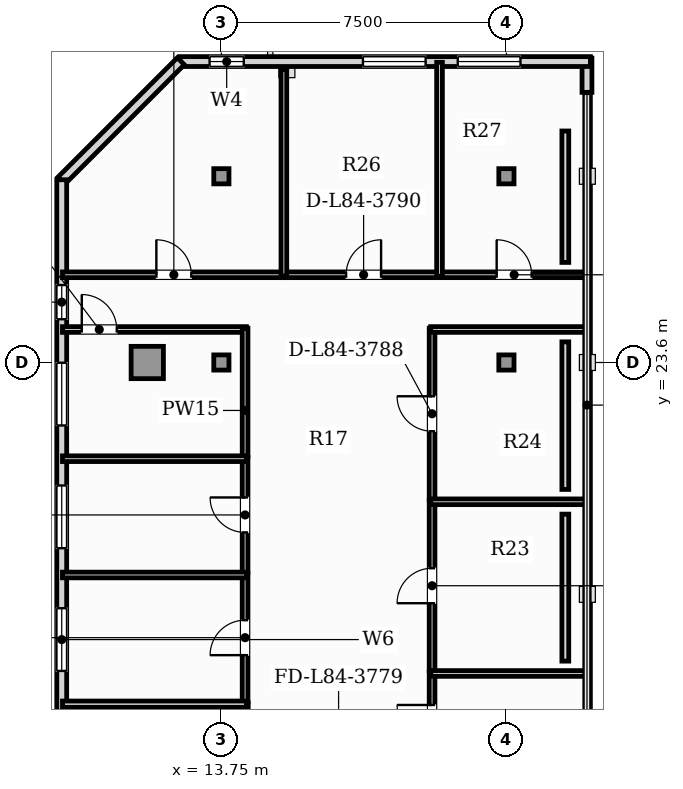
"""IFC4 building model, lengths in metres.
Left out: names, types, materials, properties, quantities, classifications, styles, units other than length and angle.
Written with IfcOpenShell. Run it as: python <this file> out.ifc"""

import sys

from ifc_helpers import new_model, si_unit, direction, frame, frame_2d, origin, origin_2d, place, context, subcontext, project, spatial, rectangle, hollow_rectangle, extrude, element, fill, save


model = new_model("IFC4")
c1 = context("Model", 3, precision=1e-05, world=origin(), true_north=direction((0.0, 1.0)))
c2 = subcontext(c1, "Body", "Model", "MODEL_VIEW")
j1 = project(units=[si_unit("LENGTHUNIT", "METRE"), si_unit("PLANEANGLEUNIT", "RADIAN")], contexts=[c1])
p1 = place(None, origin())
s1 = spatial("IfcSite", under=j1, at=p1, CompositionType="ELEMENT")
p2 = place(p1, origin())
s2 = spatial("IfcBuilding", under=s1, at=p2, CompositionType="ELEMENT")
p3 = place(p2, frame((0.0, 0.0, 341.35)))
s3 = spatial("IfcBuildingStorey", under=s2, at=p3, CompositionType="ELEMENT", Elevation=341.35)
p4 = place(p3, frame((11.8, 23.6, 0.0), z_axis=(0.0, 0.0, 1.0), x_axis=(1.0, 0.0, 0.0)))
e1 = element("IfcColumn", 1, at=p4, inside=s3, PredefinedType="USERDEFINED", context=c2, shape_type="SweptSolid", body=[
    extrude(hollow_rectangle(XDim=0.85, YDim=0.85, WallThickness=0.05, at=origin_2d()), origin(), (0.0, 0.0, 1.0), 3.85),
])
for number, where, z_axis, x_axis in (
    (2, (13.75, 23.6, 0.0), (0.0, 0.0, 1.0), (1.0, 0.0, 0.0)),
    (3, (21.25, 23.6, 0.0), (0.0, 0.0, 1.0), (1.0, 0.0, 0.0)),
    (4, (13.75, 28.5, 0.0), (0.0, 0.0, 1.0), (1.0, 0.0, 0.0)),
    (5, (21.25, 28.5, 0.0), (0.0, 0.0, 1.0), (1.0, 0.0, 0.0)),
):
    element("IfcColumn", number, at=place(p3, frame(where, z_axis=z_axis, x_axis=x_axis)), inside=s3, PredefinedType="COLUMN", context=c2, shape_type="SweptSolid", body=[
        extrude(hollow_rectangle(XDim=0.4, YDim=0.4, WallThickness=0.02, at=origin_2d()), origin(), (0.0, 0.0, 1.0), 3.85),
    ])
p5 = place(p3, frame((23.37, 30.708, 0.0), z_axis=(0.0, 0.0, 1.0), x_axis=(0.0, 1.0, 0.0)))
e6 = element("IfcWall", 6, at=p5, inside=s3, PredefinedType="SOLIDWALL", context=c2, shape_type="SweptSolid", body=[
    extrude(rectangle(XDim=0.9, YDim=0.26, at=frame_2d((0.45, 0.0))), origin(), (0.0, 0.0, 1.0), 3.63),
])
p6 = place(p3, frame((23.46, 31.518, 0.0), z_axis=(0.0, 0.0, 1.0), x_axis=(-1.0, 0.0, 0.0)))
e7 = element("IfcWall", 7, at=p6, inside=s3, PredefinedType="SOLIDWALL", context=c2, shape_type="SweptSolid", body=[
    extrude(rectangle(XDim=10.801, YDim=0.26, at=frame_2d((5.4, 0.0))), origin(), (0.0, 0.0, 1.0), 3.63),
])
p7 = place(p6, frame((9.121, 0.0, 0.95)))
e8 = element("IfcOpeningElement", 8, at=p7, cuts=e7, PredefinedType="OPENING", context=c2, shape_type="SweptSolid", body=[
    extrude(rectangle(XDim=0.9, YDim=1.5, at=frame_2d((0.45, 0.75))), frame((0.0, 0.14, 0.0), z_axis=(0.0, -1.0, 0.0), x_axis=(1.0, 0.0, 0.0)), (0.0, 0.0, 1.0), 0.28),
])
p8 = place(p6, frame((4.335, 0.0, 0.88)))
e9 = element("IfcOpeningElement", 9, at=p8, cuts=e7, PredefinedType="OPENING", context=c2, shape_type="SweptSolid", body=[
    extrude(rectangle(XDim=1.65, YDim=2.0, at=frame_2d((0.825, 1.0))), frame((0.0, 0.14, 0.0), z_axis=(0.0, -1.0, 0.0), x_axis=(1.0, 0.0, 0.0)), (0.0, 0.0, 1.0), 0.28),
])
p9 = place(p6, frame((1.84, 0.0, 0.88)))
e10 = element("IfcOpeningElement", 10, at=p9, cuts=e7, PredefinedType="OPENING", context=c2, shape_type="SweptSolid", body=[
    extrude(rectangle(XDim=1.65, YDim=2.0, at=frame_2d((0.825, 1.0))), frame((0.0, 0.14, 0.0), z_axis=(0.0, -1.0, 0.0), x_axis=(1.0, 0.0, 0.0)), (0.0, 0.0, 1.0), 0.28),
])
p10 = place(p3, frame((12.683, 31.528, 0.0), z_axis=(0.0, 0.0, 1.0), x_axis=(-0.707106781187, -0.707106781187, 0.0)))
e11 = element("IfcWall", 11, at=p10, inside=s3, PredefinedType="SOLIDWALL", context=c2, shape_type="SweptSolid", body=[
    extrude(rectangle(XDim=4.445, YDim=0.26, at=frame_2d((2.223, 0.0))), origin(), (0.0, 0.0, 1.0), 3.63),
])
p11 = place(p3, frame((9.55, 28.408, 0.0), z_axis=(0.0, 0.0, 1.0), x_axis=(0.0, -1.0, 0.0)))
e12 = element("IfcWall", 12, at=p11, inside=s3, PredefinedType="SOLIDWALL", context=c2, shape_type="SweptSolid", body=[
    extrude(rectangle(XDim=25.168, YDim=0.26, at=frame_2d((12.584, 0.0))), origin(), (0.0, 0.0, 1.0), 3.63),
])
p12 = place(p11, frame((19.503, 0.0, 0.88)))
e13 = element("IfcOpeningElement", 13, at=p12, cuts=e12, PredefinedType="OPENING", context=c2, shape_type="SweptSolid", body=[
    extrude(rectangle(XDim=1.65, YDim=2.0, at=frame_2d((0.825, 1.0))), frame((0.0, 0.14, 0.0), z_axis=(0.0, -1.0, 0.0), x_axis=(1.0, 0.0, 0.0)), (0.0, 0.0, 1.0), 0.28),
])
p13 = place(p11, frame((2.77, 0.0, 0.95)))
e14 = element("IfcOpeningElement", 14, at=p13, cuts=e12, PredefinedType="OPENING", context=c2, shape_type="SweptSolid", body=[
    extrude(rectangle(XDim=0.9, YDim=1.5, at=frame_2d((0.45, 0.75))), frame((0.0, 0.14, 0.0), z_axis=(0.0, -1.0, 0.0), x_axis=(1.0, 0.0, 0.0)), (0.0, 0.0, 1.0), 0.28),
])
p14 = place(p11, frame((11.274, 0.0, 0.88)))
e15 = element("IfcOpeningElement", 15, at=p14, cuts=e12, PredefinedType="OPENING", context=c2, shape_type="SweptSolid", body=[
    extrude(rectangle(XDim=1.65, YDim=2.0, at=frame_2d((0.825, 1.0))), frame((0.0, 0.14, 0.0), z_axis=(0.0, -1.0, 0.0), x_axis=(1.0, 0.0, 0.0)), (0.0, 0.0, 1.0), 0.28),
])
p15 = place(p11, frame((8.044, 0.0, 0.88)))
e16 = element("IfcOpeningElement", 16, at=p15, cuts=e12, PredefinedType="OPENING", context=c2, shape_type="SweptSolid", body=[
    extrude(rectangle(XDim=1.65, YDim=2.0, at=frame_2d((0.825, 1.0))), frame((0.0, 0.14, 0.0), z_axis=(0.0, -1.0, 0.0), x_axis=(1.0, 0.0, 0.0)), (0.0, 0.0, 1.0), 0.28),
])
p16 = place(p11, frame((4.815, 0.0, 0.88)))
e17 = element("IfcOpeningElement", 17, at=p16, cuts=e12, PredefinedType="OPENING", context=c2, shape_type="SweptSolid", body=[
    extrude(rectangle(XDim=1.65, YDim=2.0, at=frame_2d((0.825, 1.0))), frame((0.0, 0.14, 0.0), z_axis=(0.0, -1.0, 0.0), x_axis=(1.0, 0.0, 0.0)), (0.0, 0.0, 1.0), 0.28),
])
p17 = place(p3, frame((14.374, 12.805, 0.0), z_axis=(0.0, 0.0, 1.0), x_axis=(0.0, 1.0, 0.0)))
e18 = element("IfcWall", 18, at=p17, inside=s3, PredefinedType="PLUMBINGWALL", context=c2, shape_type="SweptSolid", body=[
    extrude(rectangle(XDim=1.84, YDim=0.165, at=frame_2d((0.92, 0.0))), origin(), (0.0, 0.0, 1.0), 3.63),
])
p18 = place(p17, frame((0.495, 0.0, 0.0)))
e19 = element("IfcOpeningElement", 19, at=p18, cuts=e18, PredefinedType="OPENING", context=c2, shape_type="SweptSolid", body=[
    extrude(rectangle(XDim=0.85, YDim=2.1, at=frame_2d((0.425, 1.05))), frame((0.0, 0.093, 0.0), z_axis=(0.0, -1.0, 0.0), x_axis=(1.0, 0.0, 0.0)), (0.0, 0.0, 1.0), 0.185),
])
p19 = place(p3, frame((14.374, 14.675, 0.0), z_axis=(0.0, 0.0, 1.0), x_axis=(0.0, 1.0, 0.0)))
e20 = element("IfcWall", 20, at=p19, inside=s3, PredefinedType="PARTITIONING", context=c2, shape_type="SweptSolid", body=[
    extrude(rectangle(XDim=3.369, YDim=0.15, at=frame_2d((1.685, 0.0))), origin(), (0.0, 0.0, 1.0), 3.63),
])
p20 = place(p19, frame((1.225, 0.0, 0.0)))
e21 = element("IfcOpeningElement", 21, at=p20, cuts=e20, PredefinedType="OPENING", context=c2, shape_type="SweptSolid", body=[
    extrude(rectangle(XDim=0.92, YDim=2.1, at=frame_2d((0.46, 1.05))), frame((0.0, 0.085, 0.0), z_axis=(0.0, -1.0, 0.0), x_axis=(1.0, 0.0, 0.0)), (0.0, 0.0, 1.0), 0.17),
])
p21 = place(p3, frame((14.374, 18.074, 0.0), z_axis=(0.0, 0.0, 1.0), x_axis=(0.0, 1.0, 0.0)))
e22 = element("IfcWall", 22, at=p21, inside=s3, PredefinedType="PARTITIONING", context=c2, shape_type="SweptSolid", body=[
    extrude(rectangle(XDim=3.03, YDim=0.15, at=frame_2d((1.515, 0.0))), origin(), (0.0, 0.0, 1.0), 3.63),
])
p22 = place(p21, frame((1.055, 0.0, 0.0)))
e23 = element("IfcOpeningElement", 23, at=p22, cuts=e22, PredefinedType="OPENING", context=c2, shape_type="SweptSolid", body=[
    extrude(rectangle(XDim=0.92, YDim=2.1, at=frame_2d((0.46, 1.05))), frame((0.0, 0.085, 0.0), z_axis=(0.0, -1.0, 0.0), x_axis=(1.0, 0.0, 0.0)), (0.0, 0.0, 1.0), 0.17),
])
p23 = place(p3, frame((9.569, 24.468, 0.0), z_axis=(0.0, 0.0, 1.0), x_axis=(1.0, 0.0, 0.0)))
e24 = element("IfcWall", 24, at=p23, inside=s3, PredefinedType="PARTITIONING", context=c2, shape_type="SweptSolid", body=[
    extrude(rectangle(XDim=4.84, YDim=0.15, at=frame_2d((2.42, 0.0))), origin(), (0.0, 0.0, 1.0), 3.63),
])
p24 = place(p23, frame((0.508, 0.0, 0.0)))
e25 = element("IfcOpeningElement", 25, at=p24, cuts=e24, PredefinedType="OPENING", context=c2, shape_type="SweptSolid", body=[
    extrude(rectangle(XDim=0.92, YDim=2.1, at=frame_2d((0.46, 1.05))), frame((0.0, 0.085, 0.0), z_axis=(0.0, -1.0, 0.0), x_axis=(1.0, 0.0, 0.0)), (0.0, 0.0, 1.0), 0.17),
])
p25 = place(p3, frame((14.374, 21.134, 0.0), z_axis=(0.0, 0.0, 1.0), x_axis=(0.0, 1.0, 0.0)))
e26 = element("IfcWall", 26, at=p25, inside=s3, PredefinedType="PARTITIONING", context=c2, shape_type="SweptSolid", body=[
    extrude(rectangle(XDim=3.369, YDim=0.15, at=frame_2d((1.685, 0.0))), origin(), (0.0, 0.0, 1.0), 3.63),
])
p26 = place(p3, frame((19.294, 12.805, 0.0), z_axis=(0.0, 0.0, 1.0), x_axis=(0.0, 1.0, 0.0)))
e27 = element("IfcWall", 27, at=p26, inside=s3, PredefinedType="PARTITIONING", context=c2, shape_type="SweptSolid", body=[
    extrude(rectangle(XDim=2.648, YDim=0.15, at=frame_2d((1.324, 0.0))), origin(), (0.0, 0.0, 1.0), 3.63),
])
p27 = place(p26, frame((0.864, 0.0, 0.0)))
e28 = element("IfcOpeningElement", 28, at=p27, cuts=e27, PredefinedType="OPENING", context=c2, shape_type="SweptSolid", body=[
    extrude(rectangle(XDim=0.92, YDim=2.1, at=frame_2d((0.46, 1.05))), frame((0.0, 0.085, 0.0), z_axis=(0.0, -1.0, 0.0), x_axis=(1.0, 0.0, 0.0)), (0.0, 0.0, 1.0), 0.17),
])
p28 = place(p3, frame((19.294, 15.483, 0.0), z_axis=(0.0, 0.0, 1.0), x_axis=(0.0, 1.0, 0.0)))
e29 = element("IfcWall", 29, at=p28, inside=s3, PredefinedType="PARTITIONING", context=c2, shape_type="SweptSolid", body=[
    extrude(rectangle(XDim=4.488, YDim=0.15, at=frame_2d((2.244, 0.0))), origin(), (0.0, 0.0, 1.0), 3.63),
])
p29 = place(p28, frame((1.784, 0.0, 0.0)))
e30 = element("IfcOpeningElement", 30, at=p29, cuts=e29, PredefinedType="OPENING", context=c2, shape_type="SweptSolid", body=[
    extrude(rectangle(XDim=0.92, YDim=2.1, at=frame_2d((0.46, 1.05))), frame((0.0, 0.085, 0.0), z_axis=(0.0, -1.0, 0.0), x_axis=(1.0, 0.0, 0.0)), (0.0, 0.0, 1.0), 0.17),
])
p30 = place(p3, frame((19.294, 20.0, 0.0), z_axis=(0.0, 0.0, 1.0), x_axis=(0.0, 1.0, 0.0)))
e31 = element("IfcWall", 31, at=p30, inside=s3, PredefinedType="PARTITIONING", context=c2, shape_type="SweptSolid", body=[
    extrude(rectangle(XDim=4.503, YDim=0.15, at=frame_2d((2.251, 0.0))), origin(), (0.0, 0.0, 1.0), 3.63),
])
p31 = place(p30, frame((1.792, 0.0, 0.0)))
e32 = element("IfcOpeningElement", 32, at=p31, cuts=e31, PredefinedType="OPENING", context=c2, shape_type="SweptSolid", body=[
    extrude(rectangle(XDim=0.92, YDim=2.1, at=frame_2d((0.46, 1.05))), frame((0.0, 0.085, 0.0), z_axis=(0.0, -1.0, 0.0), x_axis=(1.0, 0.0, 0.0)), (0.0, 0.0, 1.0), 0.17),
])
p32 = place(p3, frame((19.259, 24.468, 0.0), z_axis=(0.0, 0.0, 1.0), x_axis=(1.0, 0.0, 0.0)))
e33 = element("IfcWall", 33, at=p32, inside=s3, PredefinedType="PARTITIONING", context=c2, shape_type="SweptSolid", body=[
    extrude(rectangle(XDim=4.093, YDim=0.15, at=frame_2d((2.047, 0.0))), origin(), (0.0, 0.0, 1.0), 3.63),
])
p33 = place(p3, frame((9.569, 25.908, 0.0), z_axis=(0.0, 0.0, 1.0), x_axis=(1.0, 0.0, 0.0)))
e34 = element("IfcWall", 34, at=p33, inside=s3, PredefinedType="PARTITIONING", context=c2, shape_type="SweptSolid", body=[
    extrude(rectangle(XDim=5.861, YDim=0.15, at=frame_2d((2.93, 0.0))), origin(), (0.0, 0.0, 1.0), 3.63),
])
p34 = place(p33, frame((2.47, 0.0, 0.0)))
e35 = element("IfcOpeningElement", 35, at=p34, cuts=e34, PredefinedType="OPENING", context=c2, shape_type="SweptSolid", body=[
    extrude(rectangle(XDim=0.92, YDim=2.1, at=frame_2d((0.46, 1.05))), frame((0.0, 0.085, 0.0), z_axis=(0.0, -1.0, 0.0), x_axis=(1.0, 0.0, 0.0)), (0.0, 0.0, 1.0), 0.17),
])
p35 = place(p3, frame((15.46, 25.908, 0.0), z_axis=(0.0, 0.0, 1.0), x_axis=(1.0, 0.0, 0.0)))
e36 = element("IfcWall", 36, at=p35, inside=s3, PredefinedType="PARTITIONING", context=c2, shape_type="SweptSolid", body=[
    extrude(rectangle(XDim=4.065, YDim=0.15, at=frame_2d((2.033, 0.0))), origin(), (0.0, 0.0, 1.0), 3.63),
])
p36 = place(p35, frame((1.573, 0.0, 0.0)))
e37 = element("IfcOpeningElement", 37, at=p36, cuts=e36, PredefinedType="OPENING", context=c2, shape_type="SweptSolid", body=[
    extrude(rectangle(XDim=0.92, YDim=2.1, at=frame_2d((0.46, 1.05))), frame((0.0, 0.085, 0.0), z_axis=(0.0, -1.0, 0.0), x_axis=(1.0, 0.0, 0.0)), (0.0, 0.0, 1.0), 0.17),
])
p37 = place(p3, frame((19.555, 25.908, 0.0), z_axis=(0.0, 0.0, 1.0), x_axis=(1.0, 0.0, 0.0)))
e38 = element("IfcWall", 38, at=p37, inside=s3, PredefinedType="PARTITIONING", context=c2, shape_type="SweptSolid", body=[
    extrude(rectangle(XDim=3.797, YDim=0.15, at=frame_2d((1.898, 0.0))), origin(), (0.0, 0.0, 1.0), 3.63),
])
p38 = place(p37, frame((1.439, 0.0, 0.0)))
e39 = element("IfcOpeningElement", 39, at=p38, cuts=e38, PredefinedType="OPENING", context=c2, shape_type="SweptSolid", body=[
    extrude(rectangle(XDim=0.92, YDim=2.1, at=frame_2d((0.46, 1.05))), frame((0.0, 0.085, 0.0), z_axis=(0.0, -1.0, 0.0), x_axis=(1.0, 0.0, 0.0)), (0.0, 0.0, 1.0), 0.17),
])
p39 = place(p3, frame((9.569, 14.61, 0.0), z_axis=(0.0, 0.0, 1.0), x_axis=(1.0, 0.0, 0.0)))
e40 = element("IfcWall", 40, at=p39, inside=s3, PredefinedType="PLUMBINGWALL", context=c2, shape_type="SweptSolid", body=[
    extrude(rectangle(XDim=4.84, YDim=0.165, at=frame_2d((2.42, 0.0))), origin(), (0.0, 0.0, 1.0), 3.63),
])
for number, where, z_axis, x_axis in (
    (41, (9.569, 18.009, 0.0), (0.0, 0.0, 1.0), (1.0, 0.0, 0.0)),
    (42, (9.569, 21.069, 0.0), (0.0, 0.0, 1.0), (1.0, 0.0, 0.0)),
):
    element("IfcWall", number, at=place(p3, frame(where, z_axis=z_axis, x_axis=x_axis)), inside=s3, PredefinedType="PARTITIONING", context=c2, shape_type="SweptSolid", body=[
        extrude(rectangle(XDim=4.84, YDim=0.15, at=frame_2d((2.42, 0.0))), origin(), (0.0, 0.0, 1.0), 3.63),
    ])
for number, where, z_axis, x_axis in (
    (43, (19.259, 15.417, 0.0), (0.0, 0.0, 1.0), (1.0, 0.0, 0.0)),
    (44, (19.259, 19.935, 0.0), (0.0, 0.0, 1.0), (1.0, 0.0, 0.0)),
):
    element("IfcWall", number, at=place(p3, frame(where, z_axis=z_axis, x_axis=x_axis)), inside=s3, PredefinedType="PARTITIONING", context=c2, shape_type="SweptSolid", body=[
        extrude(rectangle(XDim=4.093, YDim=0.15, at=frame_2d((2.047, 0.0))), origin(), (0.0, 0.0, 1.0), 3.63),
    ])
p40 = place(p3, frame((15.395, 25.873, 0.0), z_axis=(0.0, 0.0, 1.0), x_axis=(0.0, 1.0, 0.0)))
e45 = element("IfcWall", 45, at=p40, inside=s3, PredefinedType="PARTITIONING", context=c2, shape_type="SweptSolid", body=[
    extrude(rectangle(XDim=5.443, YDim=0.15, at=frame_2d((2.722, 0.0))), origin(), (0.0, 0.0, 1.0), 3.63),
])
p41 = place(p3, frame((19.49, 25.873, 0.0), z_axis=(0.0, 0.0, 1.0), x_axis=(0.0, 1.0, 0.0)))
e46 = element("IfcWall", 46, at=p41, inside=s3, PredefinedType="PARTITIONING", context=c2, shape_type="SweptSolid", body=[
    extrude(rectangle(XDim=5.625, YDim=0.15, at=frame_2d((2.813, 0.0))), origin(), (0.0, 0.0, 1.0), 3.63),
])
p42 = place(p3, frame((22.8, 19.61, 0.0), z_axis=(0.0, 0.0, 1.0), x_axis=(0.0, -1.0, 0.0)))
e47 = element("IfcWall", 47, at=p42, inside=s3, PredefinedType="PARTITIONING", context=c2, shape_type="SweptSolid", body=[
    extrude(rectangle(XDim=3.867, YDim=0.18, at=frame_2d((1.934, 0.0))), origin(), (0.0, 0.0, 1.0), 3.63),
])
p43 = place(p3, frame((22.8, 24.143, 0.0), z_axis=(0.0, 0.0, 1.0), x_axis=(0.0, -1.0, 0.0)))
e48 = element("IfcWall", 48, at=p43, inside=s3, PredefinedType="PARTITIONING", context=c2, shape_type="SweptSolid", body=[
    extrude(rectangle(XDim=3.883, YDim=0.18, at=frame_2d((1.941, 0.0))), origin(), (0.0, 0.0, 1.0), 3.63),
])
p44 = place(p3, frame((22.8, 29.692, 0.0), z_axis=(0.0, 0.0, 1.0), x_axis=(0.0, -1.0, 0.0)))
e49 = element("IfcWall", 49, at=p44, inside=s3, PredefinedType="PARTITIONING", context=c2, shape_type="SweptSolid", body=[
    extrude(rectangle(XDim=3.458, YDim=0.18, at=frame_2d((1.729, 0.0))), origin(), (0.0, 0.0, 1.0), 3.63),
])
p45 = place(p13, origin())
e50 = element("IfcWindow", 50, at=p45, inside=s3, PartitioningType="SINGLE_PANEL", PredefinedType="WINDOW", context=c2, shape_type="SweptSolid", body=[
    extrude(rectangle(XDim=0.9, YDim=1.5, at=frame_2d((0.45, 0.75))), frame((0.0, 0.03, 0.0), z_axis=(0.0, -1.0, 0.0), x_axis=(1.0, 0.0, 0.0)), (0.0, 0.0, 1.0), 0.06),
])
fill(e14, e50)
p46 = place(p14, origin())
e51 = element("IfcWindow", 51, at=p46, inside=s3, PartitioningType="SINGLE_PANEL", PredefinedType="WINDOW", context=c2, shape_type="SweptSolid", body=[
    extrude(rectangle(XDim=1.65, YDim=2.0, at=frame_2d((0.825, 1.0))), frame((0.0, 0.03, 0.0), z_axis=(0.0, -1.0, 0.0), x_axis=(1.0, 0.0, 0.0)), (0.0, 0.0, 1.0), 0.06),
])
fill(e15, e51)
p47 = place(p15, origin())
e52 = element("IfcWindow", 52, at=p47, inside=s3, PartitioningType="SINGLE_PANEL", PredefinedType="WINDOW", context=c2, shape_type="SweptSolid", body=[
    extrude(rectangle(XDim=1.65, YDim=2.0, at=frame_2d((0.825, 1.0))), frame((0.0, 0.03, 0.0), z_axis=(0.0, -1.0, 0.0), x_axis=(1.0, 0.0, 0.0)), (0.0, 0.0, 1.0), 0.06),
])
fill(e16, e52)
p48 = place(p16, origin())
e53 = element("IfcWindow", 53, at=p48, inside=s3, PartitioningType="SINGLE_PANEL", PredefinedType="WINDOW", context=c2, shape_type="SweptSolid", body=[
    extrude(rectangle(XDim=1.65, YDim=2.0, at=frame_2d((0.825, 1.0))), frame((0.0, 0.03, 0.0), z_axis=(0.0, -1.0, 0.0), x_axis=(1.0, 0.0, 0.0)), (0.0, 0.0, 1.0), 0.06),
])
fill(e17, e53)
p49 = place(p7, origin())
e54 = element("IfcWindow", 54, at=p49, inside=s3, PartitioningType="SINGLE_PANEL", PredefinedType="WINDOW", context=c2, shape_type="SweptSolid", body=[
    extrude(rectangle(XDim=0.9, YDim=1.5, at=frame_2d((0.45, 0.75))), frame((0.0, 0.03, 0.0), z_axis=(0.0, -1.0, 0.0), x_axis=(1.0, 0.0, 0.0)), (0.0, 0.0, 1.0), 0.06),
])
fill(e8, e54)
p50 = place(p8, origin())
e55 = element("IfcWindow", 55, at=p50, inside=s3, PartitioningType="SINGLE_PANEL", PredefinedType="WINDOW", context=c2, shape_type="SweptSolid", body=[
    extrude(rectangle(XDim=1.65, YDim=2.0, at=frame_2d((0.825, 1.0))), frame((0.0, 0.03, 0.0), z_axis=(0.0, -1.0, 0.0), x_axis=(1.0, 0.0, 0.0)), (0.0, 0.0, 1.0), 0.06),
])
fill(e9, e55)
p51 = place(p9, origin())
e56 = element("IfcWindow", 56, at=p51, inside=s3, PartitioningType="SINGLE_PANEL", PredefinedType="WINDOW", context=c2, shape_type="SweptSolid", body=[
    extrude(rectangle(XDim=1.65, YDim=2.0, at=frame_2d((0.825, 1.0))), frame((0.0, 0.03, 0.0), z_axis=(0.0, -1.0, 0.0), x_axis=(1.0, 0.0, 0.0)), (0.0, 0.0, 1.0), 0.06),
])
fill(e10, e56)
p52 = place(p20, origin())
e57 = element("IfcDoor", 57, at=p52, inside=s3, OperationType="SINGLE_SWING_LEFT", PredefinedType="DOOR", context=c2, shape_type="SweptSolid", body=[
    extrude(rectangle(XDim=0.92, YDim=2.1, at=frame_2d((0.46, 1.05))), frame((0.0, 0.025, 0.0), z_axis=(0.0, -1.0, 0.0), x_axis=(1.0, 0.0, 0.0)), (0.0, 0.0, 1.0), 0.05),
])
fill(e21, e57)
p53 = place(p22, origin())
e58 = element("IfcDoor", 58, at=p53, inside=s3, OperationType="SINGLE_SWING_RIGHT", PredefinedType="DOOR", context=c2, shape_type="SweptSolid", body=[
    extrude(rectangle(XDim=0.92, YDim=2.1, at=frame_2d((0.46, 1.05))), frame((0.0, 0.025, 0.0), z_axis=(0.0, -1.0, 0.0), x_axis=(1.0, 0.0, 0.0)), (0.0, 0.0, 1.0), 0.05),
])
fill(e23, e58)
p54 = place(p24, origin())
e59 = element("IfcDoor", 59, at=p54, inside=s3, OperationType="SINGLE_SWING_LEFT", PredefinedType="DOOR", context=c2, shape_type="SweptSolid", body=[
    extrude(rectangle(XDim=0.92, YDim=2.1, at=frame_2d((0.46, 1.05))), frame((0.0, 0.025, 0.0), z_axis=(0.0, -1.0, 0.0), x_axis=(1.0, 0.0, 0.0)), (0.0, 0.0, 1.0), 0.05),
])
fill(e25, e59)
p55 = place(p27, origin())
e60 = element("IfcDoor", 60, at=p55, inside=s3, OperationType="SINGLE_SWING_RIGHT", PredefinedType="DOOR", context=c2, shape_type="SweptSolid", body=[
    extrude(rectangle(XDim=0.92, YDim=2.1, at=frame_2d((0.46, 1.05))), frame((0.0, 0.025, 0.0), z_axis=(0.0, -1.0, 0.0), x_axis=(1.0, 0.0, 0.0)), (0.0, 0.0, 1.0), 0.05),
])
fill(e28, e60)
p56 = place(p29, origin())
e61 = element("IfcDoor", 61, at=p56, inside=s3, OperationType="SINGLE_SWING_LEFT", PredefinedType="DOOR", context=c2, shape_type="SweptSolid", body=[
    extrude(rectangle(XDim=0.92, YDim=2.1, at=frame_2d((0.46, 1.05))), frame((0.0, 0.025, 0.0), z_axis=(0.0, -1.0, 0.0), x_axis=(1.0, 0.0, 0.0)), (0.0, 0.0, 1.0), 0.05),
])
fill(e30, e61)
p57 = place(p31, origin())
e62 = element("IfcDoor", 62, at=p57, inside=s3, OperationType="SINGLE_SWING_RIGHT", PredefinedType="DOOR", context=c2, shape_type="SweptSolid", body=[
    extrude(rectangle(XDim=0.92, YDim=2.1, at=frame_2d((0.46, 1.05))), frame((0.0, 0.025, 0.0), z_axis=(0.0, -1.0, 0.0), x_axis=(1.0, 0.0, 0.0)), (0.0, 0.0, 1.0), 0.05),
])
fill(e32, e62)
p58 = place(p34, origin())
e63 = element("IfcDoor", 63, at=p58, inside=s3, OperationType="SINGLE_SWING_LEFT", PredefinedType="DOOR", context=c2, shape_type="SweptSolid", body=[
    extrude(rectangle(XDim=0.92, YDim=2.1, at=frame_2d((0.46, 1.05))), frame((0.0, 0.025, 0.0), z_axis=(0.0, -1.0, 0.0), x_axis=(1.0, 0.0, 0.0)), (0.0, 0.0, 1.0), 0.05),
])
fill(e35, e63)
p59 = place(p36, origin())
e64 = element("IfcDoor", 64, at=p59, inside=s3, OperationType="SINGLE_SWING_RIGHT", PredefinedType="DOOR", context=c2, shape_type="SweptSolid", body=[
    extrude(rectangle(XDim=0.92, YDim=2.1, at=frame_2d((0.46, 1.05))), frame((0.0, 0.025, 0.0), z_axis=(0.0, -1.0, 0.0), x_axis=(1.0, 0.0, 0.0)), (0.0, 0.0, 1.0), 0.05),
])
fill(e37, e64)
p60 = place(p38, origin())
e65 = element("IfcDoor", 65, at=p60, inside=s3, OperationType="SINGLE_SWING_LEFT", PredefinedType="DOOR", context=c2, shape_type="SweptSolid", body=[
    extrude(rectangle(XDim=0.92, YDim=2.1, at=frame_2d((0.46, 1.05))), frame((0.0, 0.025, 0.0), z_axis=(0.0, -1.0, 0.0), x_axis=(1.0, 0.0, 0.0)), (0.0, 0.0, 1.0), 0.05),
])
fill(e39, e65)
save(model, sys.argv[1])
